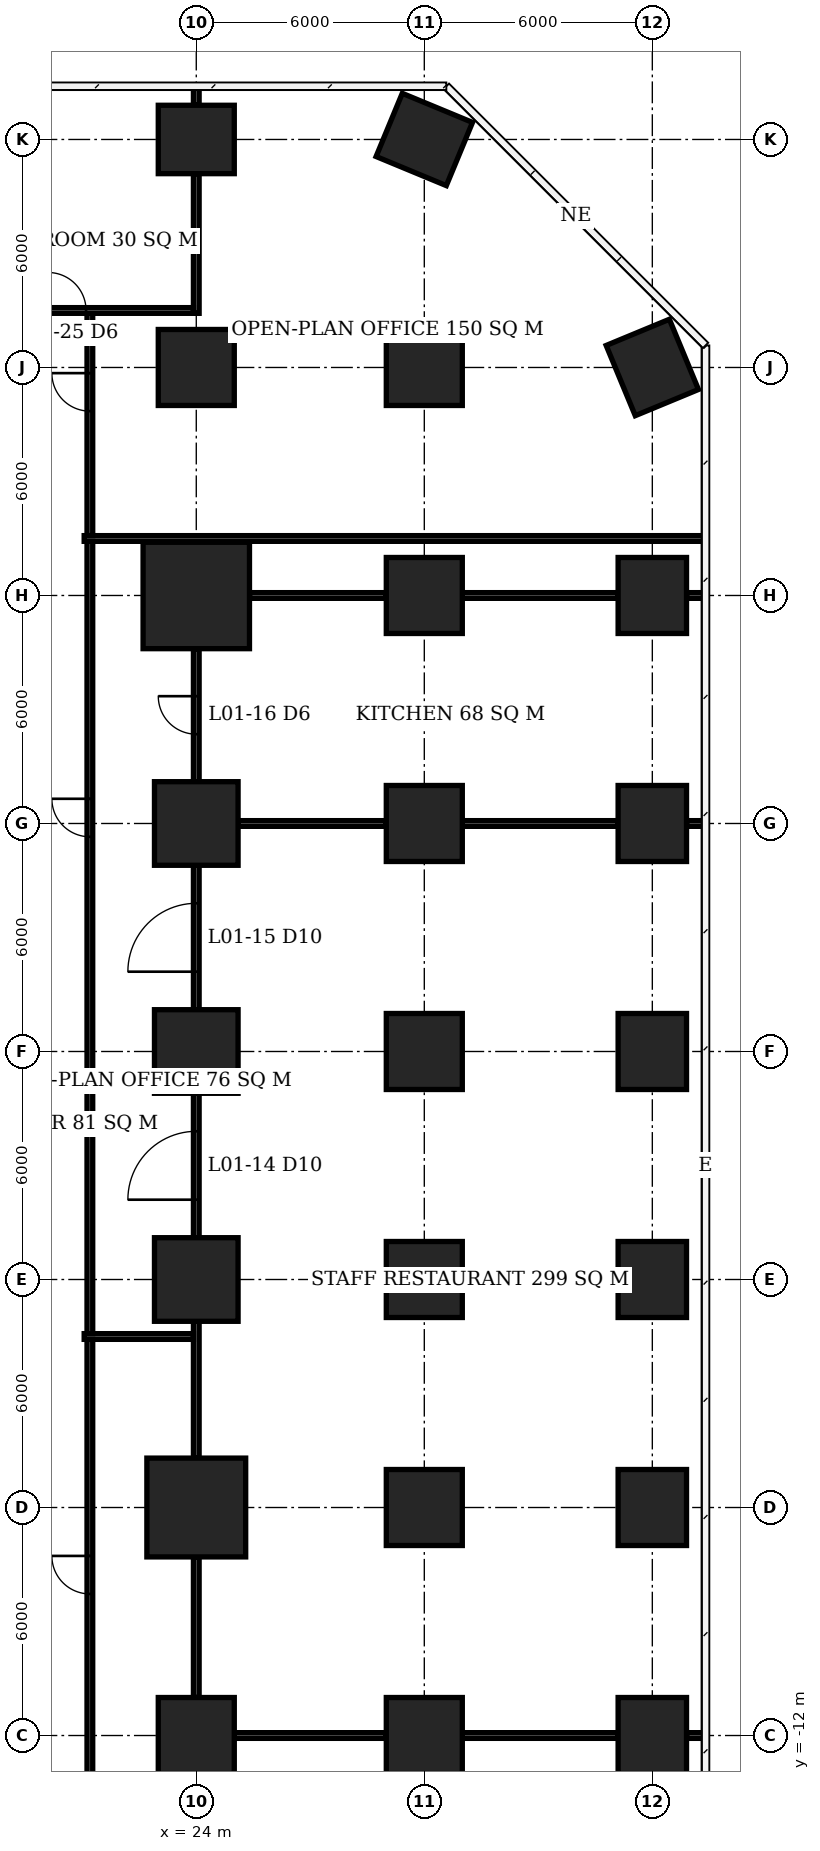
"""IFC4 building model, lengths in metres.
Left out: names, types, materials, properties, quantities, classifications, styles, units other than length and angle.
Written with IfcOpenShell. Run it as: python <this file> out.ifc"""

import sys

from ifc_helpers import new_model, si_unit, direction, frame, frame_2d, origin, origin_2d, place, context, subcontext, project, spatial, rectangle, extrude, element, fill, save


model = new_model("IFC4")
c1 = context("Model", 3, precision=1e-05, world=origin(), true_north=direction((0.0, 1.0)))
c2 = subcontext(c1, "Body", "Model", "MODEL_VIEW")
j1 = project(units=[si_unit("LENGTHUNIT", "METRE"), si_unit("PLANEANGLEUNIT", "RADIAN")], contexts=[c1])
p1 = place(None, origin())
s1 = spatial("IfcSite", under=j1, at=p1, CompositionType="ELEMENT")
p2 = place(p1, origin())
s2 = spatial("IfcBuilding", under=s1, at=p2, CompositionType="ELEMENT")
p3 = place(p2, frame((0.0, 0.0, 6.0)))
s3 = spatial("IfcBuildingStorey", under=s2, at=p3, CompositionType="ELEMENT", Elevation=6.0)
p4 = place(p3, frame((24.0, -12.0, 0.0), z_axis=(0.0, 0.0, 1.0), x_axis=(1.0, 0.0, 0.0)))
e1 = element("IfcColumn", 1, at=p4, inside=s3, PredefinedType="COLUMN", context=c2, shape_type="SweptSolid", body=[
    extrude(rectangle(XDim=2.0, YDim=2.0, at=origin_2d()), origin(), (0.0, 0.0, 1.0), 5.0),
])
p5 = place(p3, frame((24.0, -6.0, 0.0), z_axis=(0.0, 0.0, 1.0), x_axis=(1.0, 0.0, 0.0)))
e2 = element("IfcColumn", 2, at=p5, inside=s3, PredefinedType="COLUMN", context=c2, shape_type="SweptSolid", body=[
    extrude(rectangle(XDim=2.6, YDim=2.6, at=origin_2d()), origin(), (0.0, 0.0, 1.0), 5.0),
])
for number, where, z_axis, x_axis in (
    (3, (24.0, 0.0, 0.0), (0.0, 0.0, 1.0), (1.0, 0.0, 0.0)),
    (4, (24.0, 6.0, 0.0), (0.0, 0.0, 1.0), (1.0, 0.0, 0.0)),
    (5, (24.0, 12.0, 0.0), (0.0, 0.0, 1.0), (1.0, 0.0, 0.0)),
):
    element("IfcColumn", number, at=place(p3, frame(where, z_axis=z_axis, x_axis=x_axis)), inside=s3, PredefinedType="COLUMN", context=c2, shape_type="SweptSolid", body=[
        extrude(rectangle(XDim=2.2, YDim=2.2, at=origin_2d()), origin(), (0.0, 0.0, 1.0), 5.0),
    ])
p6 = place(p3, frame((24.0, 18.0, 0.0), z_axis=(0.0, 0.0, 1.0), x_axis=(1.0, 0.0, 0.0)))
e6 = element("IfcColumn", 6, at=p6, inside=s3, PredefinedType="COLUMN", context=c2, shape_type="SweptSolid", body=[
    extrude(rectangle(XDim=2.8, YDim=2.8, at=origin_2d()), origin(), (0.0, 0.0, 1.0), 5.0),
])
p7 = place(p3, frame((24.0, 24.0, 0.0), z_axis=(0.0, 0.0, 1.0), x_axis=(1.0, 0.0, 0.0)))
e7 = element("IfcColumn", 7, at=p7, inside=s3, PredefinedType="COLUMN", context=c2, shape_type="SweptSolid", body=[
    extrude(rectangle(XDim=2.0, YDim=2.0, at=origin_2d()), origin(), (0.0, 0.0, 1.0), 5.0),
])
p8 = place(p3, frame((24.0, 30.0, 0.0), z_axis=(0.0, 0.0, 1.0), x_axis=(1.0, 0.0, 0.0)))
e8 = element("IfcColumn", 8, at=p8, inside=s3, PredefinedType="COLUMN", context=c2, shape_type="SweptSolid", body=[
    extrude(rectangle(XDim=2.0, YDim=1.8, at=origin_2d()), origin(), (0.0, 0.0, 1.0), 5.0),
])
for number, where, z_axis, x_axis in (
    (9, (30.0, -12.0, 0.0), (0.0, 0.0, 1.0), (1.0, 0.0, 0.0)),
    (10, (30.0, -6.0, 0.0), (0.0, 0.0, 1.0), (1.0, 0.0, 0.0)),
    (11, (30.0, 0.0, 0.0), (0.0, 0.0, 1.0), (1.0, 0.0, 0.0)),
    (12, (30.0, 6.0, 0.0), (0.0, 0.0, 1.0), (1.0, 0.0, 0.0)),
    (13, (30.0, 12.0, 0.0), (0.0, 0.0, 1.0), (1.0, 0.0, 0.0)),
    (14, (30.0, 18.0, 0.0), (0.0, 0.0, 1.0), (1.0, 0.0, 0.0)),
    (15, (30.0, 24.0, 0.0), (0.0, 0.0, 1.0), (1.0, 0.0, 0.0)),
):
    element("IfcColumn", number, at=place(p3, frame(where, z_axis=z_axis, x_axis=x_axis)), inside=s3, PredefinedType="COLUMN", context=c2, shape_type="SweptSolid", body=[
        extrude(rectangle(XDim=2.0, YDim=2.0, at=origin_2d()), origin(), (0.0, 0.0, 1.0), 5.0),
    ])
for number, where, z_axis, x_axis in (
    (16, (30.0, 30.0, 0.0), (0.0, 0.0, 1.0), (0.924, -0.383, 0.0)),
    (17, (36.0, -12.0, 0.0), (0.0, 0.0, 1.0), (0.0, 1.0, 0.0)),
    (18, (36.0, -6.0, 0.0), (0.0, 0.0, 1.0), (0.0, 1.0, 0.0)),
    (19, (36.0, 0.0, 0.0), (0.0, 0.0, 1.0), (0.0, 1.0, 0.0)),
    (20, (36.0, 6.0, 0.0), (0.0, 0.0, 1.0), (0.0, 1.0, 0.0)),
    (21, (36.0, 12.0, 0.0), (0.0, 0.0, 1.0), (0.0, 1.0, 0.0)),
    (22, (36.0, 18.0, 0.0), (0.0, 0.0, 1.0), (0.0, 1.0, 0.0)),
    (23, (36.0, 24.0, 0.0), (0.0, 0.0, 1.0), (0.383, -0.924, 0.0)),
):
    element("IfcColumn", number, at=place(p3, frame(where, z_axis=z_axis, x_axis=x_axis)), inside=s3, PredefinedType="COLUMN", context=c2, shape_type="SweptSolid", body=[
        extrude(rectangle(XDim=2.0, YDim=1.8, at=origin_2d()), origin(), (0.0, 0.0, 1.0), 5.0),
    ])
p9 = place(p3, frame((25.0, -12.0, 0.0), z_axis=(0.0, 0.0, 1.0), x_axis=(1.0, 0.0, 0.0)))
e24 = element("IfcWall", 24, at=p9, inside=s3, PredefinedType="PARTITIONING", context=c2, shape_type="SweptSolid", body=[
    extrude(rectangle(XDim=4.0, YDim=0.15, at=frame_2d((2.0, 0.0))), origin(), (0.0, 0.0, 1.0), 4.75),
])
p10 = place(p3, frame((31.0, -12.0, 0.0), z_axis=(0.0, 0.0, 1.0), x_axis=(1.0, 0.0, 0.0)))
e25 = element("IfcWall", 25, at=p10, inside=s3, PredefinedType="PARTITIONING", context=c2, shape_type="SweptSolid", body=[
    extrude(rectangle(XDim=4.1, YDim=0.15, at=frame_2d((2.05, 0.0))), origin(), (0.0, 0.0, 1.0), 4.75),
])
p11 = place(p3, frame((36.9, -12.0, 0.0), z_axis=(0.0, 0.0, 1.0), x_axis=(1.0, 0.0, 0.0)))
e26 = element("IfcWall", 26, at=p11, inside=s3, PredefinedType="PARTITIONING", context=c2, shape_type="SweptSolid", body=[
    extrude(rectangle(XDim=0.475, YDim=0.15, at=frame_2d((0.238, 0.0))), origin(), (0.0, 0.0, 1.0), 4.75),
])
p12 = place(p3, frame((25.1, 12.0, 0.0), z_axis=(0.0, 0.0, 1.0), x_axis=(1.0, 0.0, 0.0)))
e27 = element("IfcWall", 27, at=p12, inside=s3, PredefinedType="PARTITIONING", context=c2, shape_type="SweptSolid", body=[
    extrude(rectangle(XDim=3.9, YDim=0.15, at=frame_2d((1.95, 0.0))), origin(), (0.0, 0.0, 1.0), 4.75),
])
p13 = place(p3, frame((31.0, 12.0, 0.0), z_axis=(0.0, 0.0, 1.0), x_axis=(1.0, 0.0, 0.0)))
e28 = element("IfcWall", 28, at=p13, inside=s3, PredefinedType="PARTITIONING", context=c2, shape_type="SweptSolid", body=[
    extrude(rectangle(XDim=4.1, YDim=0.15, at=frame_2d((2.05, 0.0))), origin(), (0.0, 0.0, 1.0), 4.75),
])
p14 = place(p3, frame((36.9, 12.0, 0.0), z_axis=(0.0, 0.0, 1.0), x_axis=(1.0, 0.0, 0.0)))
e29 = element("IfcWall", 29, at=p14, inside=s3, PredefinedType="PARTITIONING", context=c2, shape_type="SweptSolid", body=[
    extrude(rectangle(XDim=0.475, YDim=0.15, at=frame_2d((0.238, 0.0))), origin(), (0.0, 0.0, 1.0), 4.75),
])
p15 = place(p3, frame((25.4, 18.0, 0.0), z_axis=(0.0, 0.0, 1.0), x_axis=(1.0, 0.0, 0.0)))
e30 = element("IfcWall", 30, at=p15, inside=s3, PredefinedType="PARTITIONING", context=c2, shape_type="SweptSolid", body=[
    extrude(rectangle(XDim=3.6, YDim=0.15, at=frame_2d((1.8, 0.0))), origin(), (0.0, 0.0, 1.0), 4.75),
])
p16 = place(p3, frame((31.0, 18.0, 0.0), z_axis=(0.0, 0.0, 1.0), x_axis=(1.0, 0.0, 0.0)))
e31 = element("IfcWall", 31, at=p16, inside=s3, PredefinedType="PARTITIONING", context=c2, shape_type="SweptSolid", body=[
    extrude(rectangle(XDim=4.1, YDim=0.15, at=frame_2d((2.05, 0.0))), origin(), (0.0, 0.0, 1.0), 4.75),
])
p17 = place(p3, frame((36.9, 18.0, 0.0), z_axis=(0.0, 0.0, 1.0), x_axis=(1.0, 0.0, 0.0)))
e32 = element("IfcWall", 32, at=p17, inside=s3, PredefinedType="PARTITIONING", context=c2, shape_type="SweptSolid", body=[
    extrude(rectangle(XDim=0.475, YDim=0.15, at=frame_2d((0.238, 0.0))), origin(), (0.0, 0.0, 1.0), 4.75),
])
p18 = place(p3, frame((18.075, 25.5, 0.0), z_axis=(0.0, 0.0, 1.0), x_axis=(1.0, 0.0, 0.0)))
e33 = element("IfcWall", 33, at=p18, inside=s3, PredefinedType="PARTITIONING", context=c2, shape_type="SweptSolid", body=[
    extrude(rectangle(XDim=5.85, YDim=0.15, at=frame_2d((2.925, 0.0))), origin(), (0.0, 0.0, 1.0), 4.75),
])
p19 = place(p18, frame((2.025, 0.0, 0.0)))
e34 = element("IfcOpeningElement", 34, at=p19, cuts=e33, PredefinedType="OPENING", context=c2, shape_type="SweptSolid", body=[
    extrude(rectangle(XDim=1.0, YDim=2.1, at=frame_2d((0.5, 1.05))), frame((0.0, 0.085, 0.0), z_axis=(0.0, -1.0, 0.0), x_axis=(1.0, 0.0, 0.0)), (0.0, 0.0, 1.0), 0.17),
])
p20 = place(p3, frame((24.0, -11.0, 0.0), z_axis=(0.0, 0.0, 1.0), x_axis=(0.0, 1.0, 0.0)))
e35 = element("IfcWall", 35, at=p20, inside=s3, PredefinedType="PARTITIONING", context=c2, shape_type="SweptSolid", body=[
    extrude(rectangle(XDim=3.7, YDim=0.15, at=frame_2d((1.85, 0.0))), origin(), (0.0, 0.0, 1.0), 4.75),
])
p21 = place(p3, frame((24.0, -4.7, 0.0), z_axis=(0.0, 0.0, 1.0), x_axis=(0.0, 1.0, 0.0)))
e36 = element("IfcWall", 36, at=p21, inside=s3, PredefinedType="PARTITIONING", context=c2, shape_type="SweptSolid", body=[
    extrude(rectangle(XDim=3.6, YDim=0.15, at=frame_2d((1.8, 0.0))), origin(), (0.0, 0.0, 1.0), 4.75),
])
p22 = place(p3, frame((24.0, 1.1, 0.0), z_axis=(0.0, 0.0, 1.0), x_axis=(0.0, 1.0, 0.0)))
e37 = element("IfcWall", 37, at=p22, inside=s3, PredefinedType="PARTITIONING", context=c2, shape_type="SweptSolid", body=[
    extrude(rectangle(XDim=3.8, YDim=0.15, at=frame_2d((1.9, 0.0))), origin(), (0.0, 0.0, 1.0), 4.75),
])
p23 = place(p22, frame((1.0, 0.0, 0.0)))
e38 = element("IfcOpeningElement", 38, at=p23, cuts=e37, PredefinedType="OPENING", context=c2, shape_type="SweptSolid", body=[
    extrude(rectangle(XDim=1.8, YDim=2.4, at=frame_2d((0.9, 1.2))), frame((0.0, 0.085, 0.0), z_axis=(0.0, -1.0, 0.0), x_axis=(1.0, 0.0, 0.0)), (0.0, 0.0, 1.0), 0.17),
])
p24 = place(p3, frame((24.0, 7.1, 0.0), z_axis=(0.0, 0.0, 1.0), x_axis=(0.0, 1.0, 0.0)))
e39 = element("IfcWall", 39, at=p24, inside=s3, PredefinedType="PARTITIONING", context=c2, shape_type="SweptSolid", body=[
    extrude(rectangle(XDim=3.8, YDim=0.15, at=frame_2d((1.9, 0.0))), origin(), (0.0, 0.0, 1.0), 4.75),
])
p25 = place(p24, frame((1.0, 0.0, 0.0)))
e40 = element("IfcOpeningElement", 40, at=p25, cuts=e39, PredefinedType="OPENING", context=c2, shape_type="SweptSolid", body=[
    extrude(rectangle(XDim=1.8, YDim=2.4, at=frame_2d((0.9, 1.2))), frame((0.0, 0.085, 0.0), z_axis=(0.0, -1.0, 0.0), x_axis=(1.0, 0.0, 0.0)), (0.0, 0.0, 1.0), 0.17),
])
p26 = place(p3, frame((24.0, 13.1, 0.0), z_axis=(0.0, 0.0, 1.0), x_axis=(0.0, 1.0, 0.0)))
e41 = element("IfcWall", 41, at=p26, inside=s3, PredefinedType="PARTITIONING", context=c2, shape_type="SweptSolid", body=[
    extrude(rectangle(XDim=3.5, YDim=0.15, at=frame_2d((1.75, 0.0))), origin(), (0.0, 0.0, 1.0), 4.75),
])
p27 = place(p26, frame((1.25, 0.0, 0.0)))
e42 = element("IfcOpeningElement", 42, at=p27, cuts=e41, PredefinedType="OPENING", context=c2, shape_type="SweptSolid", body=[
    extrude(rectangle(XDim=1.0, YDim=2.1, at=frame_2d((0.5, 1.05))), frame((0.0, 0.085, 0.0), z_axis=(0.0, -1.0, 0.0), x_axis=(1.0, 0.0, 0.0)), (0.0, 0.0, 1.0), 0.17),
])
p28 = place(p3, frame((24.0, 25.425, 0.0), z_axis=(0.0, 0.0, 1.0), x_axis=(0.0, 1.0, 0.0)))
e43 = element("IfcWall", 43, at=p28, inside=s3, PredefinedType="PARTITIONING", context=c2, shape_type="SweptSolid", body=[
    extrude(rectangle(XDim=3.675, YDim=0.15, at=frame_2d((1.837, 0.0))), origin(), (0.0, 0.0, 1.0), 4.75),
])
p29 = place(p3, frame((24.0, 30.9, 0.0), z_axis=(0.0, 0.0, 1.0), x_axis=(0.0, 1.0, 0.0)))
e44 = element("IfcWall", 44, at=p29, inside=s3, PredefinedType="PARTITIONING", context=c2, shape_type="SweptSolid", body=[
    extrude(rectangle(XDim=0.475, YDim=0.15, at=frame_2d((0.238, 0.0))), origin(), (0.0, 0.0, 1.0), 4.75),
])
p30 = place(p3, frame((21.2, -19.425, 0.0), z_axis=(0.0, 0.0, 1.0), x_axis=(0.0, 1.0, 0.0)))
e45 = element("IfcWall", 45, at=p30, inside=s3, PredefinedType="PARTITIONING", context=c2, shape_type="SweptSolid", body=[
    extrude(rectangle(XDim=17.85, YDim=0.15, at=frame_2d((8.925, 0.0))), origin(), (0.0, 0.0, 1.0), 4.75),
])
p31 = place(p30, frame((11.151, 0.0, 0.0)))
e46 = element("IfcOpeningElement", 46, at=p31, cuts=e45, PredefinedType="OPENING", context=c2, shape_type="SweptSolid", body=[
    extrude(rectangle(XDim=1.0, YDim=2.1, at=frame_2d((0.5, 1.05))), frame((0.0, 0.085, 0.0), z_axis=(0.0, -1.0, 0.0), x_axis=(1.0, 0.0, 0.0)), (0.0, 0.0, 1.0), 0.17),
])
p32 = place(p3, frame((21.2, -1.425, 0.0), z_axis=(0.0, 0.0, 1.0), x_axis=(0.0, 1.0, 0.0)))
e47 = element("IfcWall", 47, at=p32, inside=s3, PredefinedType="PARTITIONING", context=c2, shape_type="SweptSolid", body=[
    extrude(rectangle(XDim=20.85, YDim=0.15, at=frame_2d((10.425, 0.0))), origin(), (0.0, 0.0, 1.0), 4.75),
])
p33 = place(p32, frame((13.075, 0.0, 0.0)))
e48 = element("IfcOpeningElement", 48, at=p33, cuts=e47, PredefinedType="OPENING", context=c2, shape_type="SweptSolid", body=[
    extrude(rectangle(XDim=1.0, YDim=2.1, at=frame_2d((0.5, 1.05))), frame((0.0, 0.085, 0.0), z_axis=(0.0, -1.0, 0.0), x_axis=(1.0, 0.0, 0.0)), (0.0, 0.0, 1.0), 0.17),
])
p34 = place(p3, frame((21.05, -1.5, 0.0), z_axis=(0.0, 0.0, 1.0), x_axis=(1.0, 0.0, 0.0)))
e49 = element("IfcWall", 49, at=p34, inside=s3, PredefinedType="PARTITIONING", context=c2, shape_type="SweptSolid", body=[
    extrude(rectangle(XDim=2.875, YDim=0.15, at=frame_2d((1.438, 0.0))), origin(), (0.0, 0.0, 1.0), 4.75),
])
p35 = place(p3, frame((21.2, 19.575, 0.0), z_axis=(0.0, 0.0, 1.0), x_axis=(0.0, 1.0, 0.0)))
e50 = element("IfcWall", 50, at=p35, inside=s3, PredefinedType="PARTITIONING", context=c2, shape_type="SweptSolid", body=[
    extrude(rectangle(XDim=5.85, YDim=0.15, at=frame_2d((2.925, 0.0))), origin(), (0.0, 0.0, 1.0), 4.75),
])
p36 = place(p35, frame((3.276, 0.0, 0.0)))
e51 = element("IfcOpeningElement", 51, at=p36, cuts=e50, PredefinedType="OPENING", context=c2, shape_type="SweptSolid", body=[
    extrude(rectangle(XDim=1.0, YDim=2.1, at=frame_2d((0.5, 1.05))), frame((0.0, 0.085, 0.0), z_axis=(0.0, -1.0, 0.0), x_axis=(1.0, 0.0, 0.0)), (0.0, 0.0, 1.0), 0.17),
])
p37 = place(p3, frame((21.05, 19.5, 0.0), z_axis=(0.0, 0.0, 1.0), x_axis=(1.0, 0.0, 0.0)))
e52 = element("IfcWall", 52, at=p37, inside=s3, PredefinedType="PARTITIONING", context=c2, shape_type="SweptSolid", body=[
    extrude(rectangle(XDim=16.325, YDim=0.15, at=frame_2d((8.163, 0.0))), origin(), (0.0, 0.0, 1.0), 4.75),
])
p38 = place(p23, origin())
e53 = element("IfcDoor", 53, at=p38, inside=s3, OperationType="DOUBLE_DOOR_SINGLE_SWING", PredefinedType="DOOR", context=c2, shape_type="SweptSolid", body=[
    extrude(rectangle(XDim=1.8, YDim=2.4, at=frame_2d((0.9, 1.2))), frame((0.0, 0.025, 0.0), z_axis=(0.0, -1.0, 0.0), x_axis=(1.0, 0.0, 0.0)), (0.0, 0.0, 1.0), 0.05),
])
fill(e38, e53)
p39 = place(p25, origin())
e54 = element("IfcDoor", 54, at=p39, inside=s3, OperationType="DOUBLE_DOOR_SINGLE_SWING", PredefinedType="DOOR", context=c2, shape_type="SweptSolid", body=[
    extrude(rectangle(XDim=1.8, YDim=2.4, at=frame_2d((0.9, 1.2))), frame((0.0, 0.025, 0.0), z_axis=(0.0, -1.0, 0.0), x_axis=(1.0, 0.0, 0.0)), (0.0, 0.0, 1.0), 0.05),
])
fill(e40, e54)
p40 = place(p27, origin())
e55 = element("IfcDoor", 55, at=p40, inside=s3, OperationType="SINGLE_SWING_RIGHT", PredefinedType="DOOR", context=c2, shape_type="SweptSolid", body=[
    extrude(rectangle(XDim=1.0, YDim=2.1, at=frame_2d((0.5, 1.05))), frame((0.0, 0.025, 0.0), z_axis=(0.0, -1.0, 0.0), x_axis=(1.0, 0.0, 0.0)), (0.0, 0.0, 1.0), 0.05),
])
fill(e42, e55)
p41 = place(p19, origin())
e56 = element("IfcDoor", 56, at=p41, inside=s3, OperationType="SINGLE_SWING_LEFT", PredefinedType="DOOR", context=c2, shape_type="SweptSolid", body=[
    extrude(rectangle(XDim=1.0, YDim=2.1, at=frame_2d((0.5, 1.05))), frame((0.0, 0.025, 0.0), z_axis=(0.0, -1.0, 0.0), x_axis=(1.0, 0.0, 0.0)), (0.0, 0.0, 1.0), 0.05),
])
fill(e34, e56)
p42 = place(p31, origin())
e57 = element("IfcDoor", 57, at=p42, inside=s3, OperationType="SINGLE_SWING_RIGHT", PredefinedType="DOOR", context=c2, shape_type="SweptSolid", body=[
    extrude(rectangle(XDim=1.0, YDim=2.1, at=frame_2d((0.5, 1.05))), frame((0.0, 0.025, 0.0), z_axis=(0.0, -1.0, 0.0), x_axis=(1.0, 0.0, 0.0)), (0.0, 0.0, 1.0), 0.05),
])
fill(e46, e57)
p43 = place(p33, origin())
e58 = element("IfcDoor", 58, at=p43, inside=s3, OperationType="SINGLE_SWING_RIGHT", PredefinedType="DOOR", context=c2, shape_type="SweptSolid", body=[
    extrude(rectangle(XDim=1.0, YDim=2.1, at=frame_2d((0.5, 1.05))), frame((0.0, 0.025, 0.0), z_axis=(0.0, -1.0, 0.0), x_axis=(1.0, 0.0, 0.0)), (0.0, 0.0, 1.0), 0.05),
])
fill(e48, e58)
p44 = place(p36, origin())
e59 = element("IfcDoor", 59, at=p44, inside=s3, OperationType="SINGLE_SWING_RIGHT", PredefinedType="DOOR", context=c2, shape_type="SweptSolid", body=[
    extrude(rectangle(XDim=1.0, YDim=2.1, at=frame_2d((0.5, 1.05))), frame((0.0, 0.025, 0.0), z_axis=(0.0, -1.0, 0.0), x_axis=(1.0, 0.0, 0.0)), (0.0, 0.0, 1.0), 0.05),
])
fill(e51, e59)
save(model, sys.argv[1])
